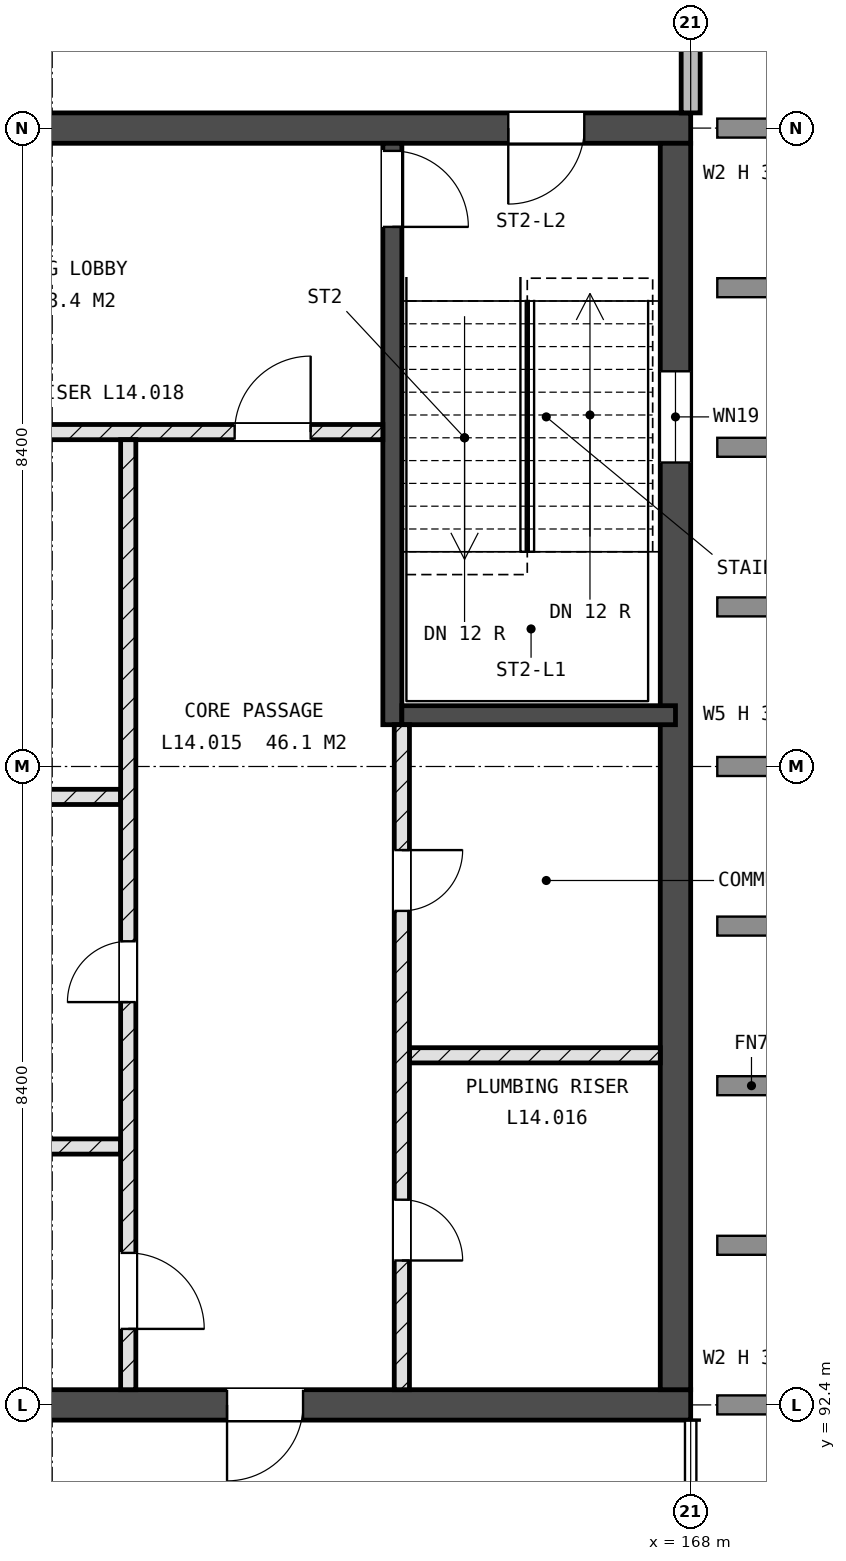
"""IFC4 building model, lengths in metres.
Left out: names, types, materials, properties, quantities, classifications, styles, units other than length and angle.
Written with IfcOpenShell. Run it as: python <this file> out.ifc"""

import sys

from ifc_helpers import new_model, si_unit, direction, frame, frame_2d, origin, place, context, subcontext, project, spatial, rectangle, extrude, element, fill, save


model = new_model("IFC4")
c1 = context("Model", 3, precision=1e-05, world=origin(), true_north=direction((0.0, 1.0)))
c2 = subcontext(c1, "Body", "Model", "MODEL_VIEW")
j1 = project(units=[si_unit("LENGTHUNIT", "METRE"), si_unit("PLANEANGLEUNIT", "RADIAN")], contexts=[c1])
p1 = place(None, origin())
s1 = spatial("IfcSite", under=j1, at=p1, CompositionType="ELEMENT")
p2 = place(p1, origin())
s2 = spatial("IfcBuilding", under=s1, at=p2, CompositionType="ELEMENT")
p3 = place(p2, frame((0.0, 0.0, 54.0)))
s3 = spatial("IfcBuildingStorey", under=s2, at=p3, CompositionType="ELEMENT", Elevation=54.0)
p4 = place(p3, frame((142.8, 92.4, -0.3), z_axis=(0.0, 0.0, 1.0), x_axis=(1.0, 0.0, 0.0)))
e1 = element("IfcWall", 1, at=p4, inside=s3, PredefinedType="SHEAR", context=c2, shape_type="SweptSolid", body=[
    extrude(rectangle(XDim=25.2, YDim=0.4, at=frame_2d((12.6, 0.0))), origin(), (0.0, 0.0, 1.0), 3.6),
])
p5 = place(p4, frame((1.4, 0.0, 0.3)))
e2 = element("IfcOpeningElement", 2, at=p5, cuts=e1, PredefinedType="OPENING", context=c2, shape_type="SweptSolid", body=[
    extrude(rectangle(XDim=1.0, YDim=2.1, at=frame_2d((0.5, 1.05))), frame((0.0, 0.21, 0.0), z_axis=(0.0, -1.0, 0.0), x_axis=(1.0, 0.0, 0.0)), (0.0, 0.0, 1.0), 0.42),
])
p6 = place(p4, frame((19.1, 0.0, 0.3)))
e3 = element("IfcOpeningElement", 3, at=p6, cuts=e1, PredefinedType="OPENING", context=c2, shape_type="SweptSolid", body=[
    extrude(rectangle(XDim=1.0, YDim=2.1, at=frame_2d((0.5, 1.05))), frame((0.0, 0.21, 0.0), z_axis=(0.0, -1.0, 0.0), x_axis=(1.0, 0.0, 0.0)), (0.0, 0.0, 1.0), 0.42),
])
p7 = place(p4, frame((10.4, 0.0, 0.3)))
e4 = element("IfcOpeningElement", 4, at=p7, cuts=e1, PredefinedType="OPENING", context=c2, shape_type="SweptSolid", body=[
    extrude(rectangle(XDim=1.0, YDim=2.1, at=frame_2d((0.5, 1.05))), frame((0.0, 0.21, 0.0), z_axis=(0.0, -1.0, 0.0), x_axis=(1.0, 0.0, 0.0)), (0.0, 0.0, 1.0), 0.42),
])
p8 = place(p3, frame((142.8, 109.2, -0.3), z_axis=(0.0, 0.0, 1.0), x_axis=(1.0, 0.0, 0.0)))
e5 = element("IfcWall", 5, at=p8, inside=s3, PredefinedType="SHEAR", context=c2, shape_type="SweptSolid", body=[
    extrude(rectangle(XDim=25.2, YDim=0.4, at=frame_2d((12.6, 0.0))), origin(), (0.0, 0.0, 1.0), 3.6),
])
p9 = place(p8, frame((22.8, 0.0, 0.3)))
e6 = element("IfcOpeningElement", 6, at=p9, cuts=e5, PredefinedType="OPENING", context=c2, shape_type="SweptSolid", body=[
    extrude(rectangle(XDim=1.0, YDim=2.1, at=frame_2d((0.5, 1.05))), frame((0.0, 0.21, 0.0), z_axis=(0.0, -1.0, 0.0), x_axis=(1.0, 0.0, 0.0)), (0.0, 0.0, 1.0), 0.42),
])
p10 = place(p8, frame((1.5, 0.0, 0.3)))
e7 = element("IfcOpeningElement", 7, at=p10, cuts=e5, PredefinedType="OPENING", context=c2, shape_type="SweptSolid", body=[
    extrude(rectangle(XDim=0.8, YDim=2.1, at=frame_2d((0.4, 1.05))), frame((0.0, 0.21, 0.0), z_axis=(0.0, -1.0, 0.0), x_axis=(1.0, 0.0, 0.0)), (0.0, 0.0, 1.0), 0.42),
])
p11 = place(p8, frame((13.4, 0.0, 0.3)))
e8 = element("IfcOpeningElement", 8, at=p11, cuts=e5, PredefinedType="OPENING", context=c2, shape_type="SweptSolid", body=[
    extrude(rectangle(XDim=1.0, YDim=2.1, at=frame_2d((0.5, 1.05))), frame((0.0, 0.21, 0.0), z_axis=(0.0, -1.0, 0.0), x_axis=(1.0, 0.0, 0.0)), (0.0, 0.0, 1.0), 0.42),
])
p12 = place(p3, frame((167.8, 92.6, -0.3), z_axis=(0.0, 0.0, 1.0), x_axis=(0.0, 1.0, 0.0)))
e9 = element("IfcWall", 9, at=p12, inside=s3, PredefinedType="SHEAR", context=c2, shape_type="SweptSolid", body=[
    extrude(rectangle(XDim=16.4, YDim=0.4, at=frame_2d((8.2, 0.0))), origin(), (0.0, 0.0, 1.0), 3.6),
])
p13 = place(p12, frame((12.2, 0.0, 1.9)))
e10 = element("IfcOpeningElement", 10, at=p13, cuts=e9, PredefinedType="OPENING", context=c2, shape_type="SweptSolid", body=[
    extrude(rectangle(XDim=1.2, YDim=0.9, at=frame_2d((0.6, 0.45))), frame((0.0, 0.21, 0.0), z_axis=(0.0, -1.0, 0.0), x_axis=(1.0, 0.0, 0.0)), (0.0, 0.0, 1.0), 0.42),
])
p14 = place(p3, frame((164.075, 101.35, -0.3), z_axis=(0.0, 0.0, 1.0), x_axis=(0.0, 1.0, 0.0)))
e11 = element("IfcWall", 11, at=p14, inside=s3, PredefinedType="SHEAR", context=c2, shape_type="SweptSolid", body=[
    extrude(rectangle(XDim=7.65, YDim=0.25, at=frame_2d((3.825, 0.0))), origin(), (0.0, 0.0, 1.0), 3.6),
])
p15 = place(p14, frame((6.55, 0.0, 0.3)))
e12 = element("IfcOpeningElement", 12, at=p15, cuts=e11, PredefinedType="OPENING", context=c2, shape_type="SweptSolid", body=[
    extrude(rectangle(XDim=1.0, YDim=2.1, at=frame_2d((0.5, 1.05))), frame((0.0, 0.135, 0.0), z_axis=(0.0, -1.0, 0.0), x_axis=(1.0, 0.0, 0.0)), (0.0, 0.0, 1.0), 0.27),
])
p16 = place(p3, frame((164.2, 101.475, -0.3), z_axis=(0.0, 0.0, 1.0), x_axis=(1.0, 0.0, 0.0)))
e13 = element("IfcWall", 13, at=p16, inside=s3, PredefinedType="SHEAR", context=c2, shape_type="SweptSolid", body=[
    extrude(rectangle(XDim=3.6, YDim=0.25, at=frame_2d((1.8, 0.0))), origin(), (0.0, 0.0, 1.0), 3.6),
])
p17 = place(p3, frame((168.0, 109.4, 0.0), z_axis=(0.0, 0.0, 1.0), x_axis=(0.0, 1.0, 0.0)))
e14 = element("IfcWall", 14, at=p17, inside=s3, PredefinedType="STANDARD", context=c2, shape_type="SweptSolid", body=[
    extrude(rectangle(XDim=1.6, YDim=0.25, at=frame_2d((0.8, 0.0))), origin(), (0.0, 0.0, 1.0), 3.3),
])
p18 = place(p3, frame((158.25, 95.8, 0.0), z_axis=(0.0, 0.0, 1.0), x_axis=(1.0, 0.0, 0.0)))
e15 = element("IfcWall", 15, at=p18, inside=s3, PredefinedType="SOLIDWALL", context=c2, shape_type="SweptSolid", body=[
    extrude(rectangle(XDim=2.25, YDim=0.2, at=frame_2d((1.125, 0.0))), origin(), (0.0, 0.0, 1.0), 3.3),
])
p19 = place(p3, frame((164.3, 97.0, 0.0), z_axis=(0.0, 0.0, 1.0), x_axis=(1.0, 0.0, 0.0)))
e16 = element("IfcWall", 16, at=p19, inside=s3, PredefinedType="SOLIDWALL", context=c2, shape_type="SweptSolid", body=[
    extrude(rectangle(XDim=3.3, YDim=0.2, at=frame_2d((1.65, 0.0))), origin(), (0.0, 0.0, 1.0), 3.3),
])
p20 = place(p3, frame((146.5, 100.4, 0.0), z_axis=(0.0, 0.0, 1.0), x_axis=(1.0, 0.0, 0.0)))
e17 = element("IfcWall", 17, at=p20, inside=s3, PredefinedType="SOLIDWALL", context=c2, shape_type="SweptSolid", body=[
    extrude(rectangle(XDim=14.0, YDim=0.2, at=frame_2d((7.0, 0.0))), origin(), (0.0, 0.0, 1.0), 3.3),
])
p21 = place(p3, frame((143.2, 105.2, 0.0), z_axis=(0.0, 0.0, 1.0), x_axis=(1.0, 0.0, 0.0)))
e18 = element("IfcWall", 18, at=p21, inside=s3, PredefinedType="SOLIDWALL", context=c2, shape_type="SweptSolid", body=[
    extrude(rectangle(XDim=20.75, YDim=0.2, at=frame_2d((10.375, 0.0))), origin(), (0.0, 0.0, 1.0), 3.3),
])
p22 = place(p21, frame((11.5, 0.0, 0.0)))
e19 = element("IfcOpeningElement", 19, at=p22, cuts=e18, PredefinedType="OPENING", context=c2, shape_type="SweptSolid", body=[
    extrude(rectangle(XDim=0.8, YDim=2.1, at=frame_2d((0.4, 1.05))), frame((0.0, 0.11, 0.0), z_axis=(0.0, -1.0, 0.0), x_axis=(1.0, 0.0, 0.0)), (0.0, 0.0, 1.0), 0.22),
])
p23 = place(p21, frame((18.8, 0.0, 0.0)))
e20 = element("IfcOpeningElement", 20, at=p23, cuts=e18, PredefinedType="OPENING", context=c2, shape_type="SweptSolid", body=[
    extrude(rectangle(XDim=1.0, YDim=2.1, at=frame_2d((0.5, 1.05))), frame((0.0, 0.11, 0.0), z_axis=(0.0, -1.0, 0.0), x_axis=(1.0, 0.0, 0.0)), (0.0, 0.0, 1.0), 0.22),
])
p24 = place(p3, frame((160.6, 92.6, 0.0), z_axis=(0.0, 0.0, 1.0), x_axis=(0.0, 1.0, 0.0)))
e21 = element("IfcWall", 21, at=p24, inside=s3, PredefinedType="SOLIDWALL", context=c2, shape_type="SweptSolid", body=[
    extrude(rectangle(XDim=12.5, YDim=0.2, at=frame_2d((6.25, 0.0))), origin(), (0.0, 0.0, 1.0), 3.3),
])
p25 = place(p24, frame((5.1, 0.0, 0.0)))
e22 = element("IfcOpeningElement", 22, at=p25, cuts=e21, PredefinedType="OPENING", context=c2, shape_type="SweptSolid", body=[
    extrude(rectangle(XDim=0.8, YDim=2.1, at=frame_2d((0.4, 1.05))), frame((0.0, 0.11, 0.0), z_axis=(0.0, -1.0, 0.0), x_axis=(1.0, 0.0, 0.0)), (0.0, 0.0, 1.0), 0.22),
])
p26 = place(p24, frame((0.8, 0.0, 0.0)))
e23 = element("IfcOpeningElement", 23, at=p26, cuts=e21, PredefinedType="OPENING", context=c2, shape_type="SweptSolid", body=[
    extrude(rectangle(XDim=1.0, YDim=2.1, at=frame_2d((0.5, 1.05))), frame((0.0, 0.11, 0.0), z_axis=(0.0, -1.0, 0.0), x_axis=(1.0, 0.0, 0.0)), (0.0, 0.0, 1.0), 0.22),
])
p27 = place(p3, frame((164.2, 92.6, 0.0), z_axis=(0.0, 0.0, 1.0), x_axis=(0.0, 1.0, 0.0)))
e24 = element("IfcWall", 24, at=p27, inside=s3, PredefinedType="SOLIDWALL", context=c2, shape_type="SweptSolid", body=[
    extrude(rectangle(XDim=8.75, YDim=0.2, at=frame_2d((4.375, 0.0))), origin(), (0.0, 0.0, 1.0), 3.3),
])
p28 = place(p27, frame((1.7, 0.0, 0.0)))
e25 = element("IfcOpeningElement", 25, at=p28, cuts=e24, PredefinedType="OPENING", context=c2, shape_type="SweptSolid", body=[
    extrude(rectangle(XDim=0.8, YDim=2.1, at=frame_2d((0.4, 1.05))), frame((0.0, 0.11, 0.0), z_axis=(0.0, -1.0, 0.0), x_axis=(1.0, 0.0, 0.0)), (0.0, 0.0, 1.0), 0.22),
])
p29 = place(p27, frame((6.3, 0.0, 0.0)))
e26 = element("IfcOpeningElement", 26, at=p29, cuts=e24, PredefinedType="OPENING", context=c2, shape_type="SweptSolid", body=[
    extrude(rectangle(XDim=0.8, YDim=2.1, at=frame_2d((0.4, 1.05))), frame((0.0, 0.11, 0.0), z_axis=(0.0, -1.0, 0.0), x_axis=(1.0, 0.0, 0.0)), (0.0, 0.0, 1.0), 0.22),
])
p30 = place(p13, origin())
e27 = element("IfcWindow", 27, at=p30, inside=s3, PartitioningType="SINGLE_PANEL", PredefinedType="WINDOW", context=c2, shape_type="SweptSolid", body=[
    extrude(rectangle(XDim=1.2, YDim=0.9, at=frame_2d((0.6, 0.45))), frame((0.0, 0.03, 0.0), z_axis=(0.0, -1.0, 0.0), x_axis=(1.0, 0.0, 0.0)), (0.0, 0.0, 1.0), 0.06),
])
fill(e10, e27)
p31 = place(p15, origin())
e28 = element("IfcDoor", 28, at=p31, inside=s3, OperationType="SINGLE_SWING_LEFT", PredefinedType="DOOR", context=c2, shape_type="SweptSolid", body=[
    extrude(rectangle(XDim=1.0, YDim=2.1, at=frame_2d((0.5, 1.05))), frame((0.0, 0.025, 0.0), z_axis=(0.0, -1.0, 0.0), x_axis=(1.0, 0.0, 0.0)), (0.0, 0.0, 1.0), 0.05),
])
fill(e12, e28)
p32 = place(p9, origin())
e29 = element("IfcDoor", 29, at=p32, inside=s3, OperationType="SINGLE_SWING_LEFT", PredefinedType="DOOR", context=c2, shape_type="SweptSolid", body=[
    extrude(rectangle(XDim=1.0, YDim=2.1, at=frame_2d((0.5, 1.05))), frame((0.0, 0.025, 0.0), z_axis=(0.0, -1.0, 0.0), x_axis=(1.0, 0.0, 0.0)), (0.0, 0.0, 1.0), 0.05),
])
fill(e6, e29)
p33 = place(p28, origin())
e30 = element("IfcDoor", 30, at=p33, inside=s3, OperationType="SINGLE_SWING_LEFT", PredefinedType="DOOR", context=c2, shape_type="SweptSolid", body=[
    extrude(rectangle(XDim=0.8, YDim=2.1, at=frame_2d((0.4, 1.05))), frame((0.0, 0.025, 0.0), z_axis=(0.0, -1.0, 0.0), x_axis=(1.0, 0.0, 0.0)), (0.0, 0.0, 1.0), 0.05),
])
fill(e25, e30)
p34 = place(p29, origin())
e31 = element("IfcDoor", 31, at=p34, inside=s3, OperationType="SINGLE_SWING_RIGHT", PredefinedType="DOOR", context=c2, shape_type="SweptSolid", body=[
    extrude(rectangle(XDim=0.8, YDim=2.1, at=frame_2d((0.4, 1.05))), frame((0.0, 0.025, 0.0), z_axis=(0.0, -1.0, 0.0), x_axis=(1.0, 0.0, 0.0)), (0.0, 0.0, 1.0), 0.05),
])
fill(e26, e31)
p35 = place(p25, origin())
e32 = element("IfcDoor", 32, at=p35, inside=s3, OperationType="SINGLE_SWING_RIGHT", PredefinedType="DOOR", context=c2, shape_type="SweptSolid", body=[
    extrude(rectangle(XDim=0.8, YDim=2.1, at=frame_2d((0.4, 1.05))), frame((0.0, 0.025, 0.0), z_axis=(0.0, -1.0, 0.0), x_axis=(1.0, 0.0, 0.0)), (0.0, 0.0, 1.0), 0.05),
])
fill(e22, e32)
p36 = place(p6, origin())
e33 = element("IfcDoor", 33, at=p36, inside=s3, OperationType="SINGLE_SWING_LEFT", PredefinedType="DOOR", context=c2, shape_type="SweptSolid", body=[
    extrude(rectangle(XDim=1.0, YDim=2.1, at=frame_2d((0.5, 1.05))), frame((0.0, 0.025, 0.0), z_axis=(0.0, -1.0, 0.0), x_axis=(1.0, 0.0, 0.0)), (0.0, 0.0, 1.0), 0.05),
])
fill(e3, e33)
p37 = place(p26, origin())
e34 = element("IfcDoor", 34, at=p37, inside=s3, OperationType="SINGLE_SWING_LEFT", PredefinedType="DOOR", context=c2, shape_type="SweptSolid", body=[
    extrude(rectangle(XDim=1.0, YDim=2.1, at=frame_2d((0.5, 1.05))), frame((0.0, 0.025, 0.0), z_axis=(0.0, -1.0, 0.0), x_axis=(1.0, 0.0, 0.0)), (0.0, 0.0, 1.0), 0.05),
])
fill(e23, e34)
p38 = place(p23, origin())
e35 = element("IfcDoor", 35, at=p38, inside=s3, OperationType="SINGLE_SWING_LEFT", PredefinedType="DOOR", context=c2, shape_type="SweptSolid", body=[
    extrude(rectangle(XDim=1.0, YDim=2.1, at=frame_2d((0.5, 1.05))), frame((0.0, 0.025, 0.0), z_axis=(0.0, -1.0, 0.0), x_axis=(1.0, 0.0, 0.0)), (0.0, 0.0, 1.0), 0.05),
])
fill(e20, e35)
save(model, sys.argv[1])
